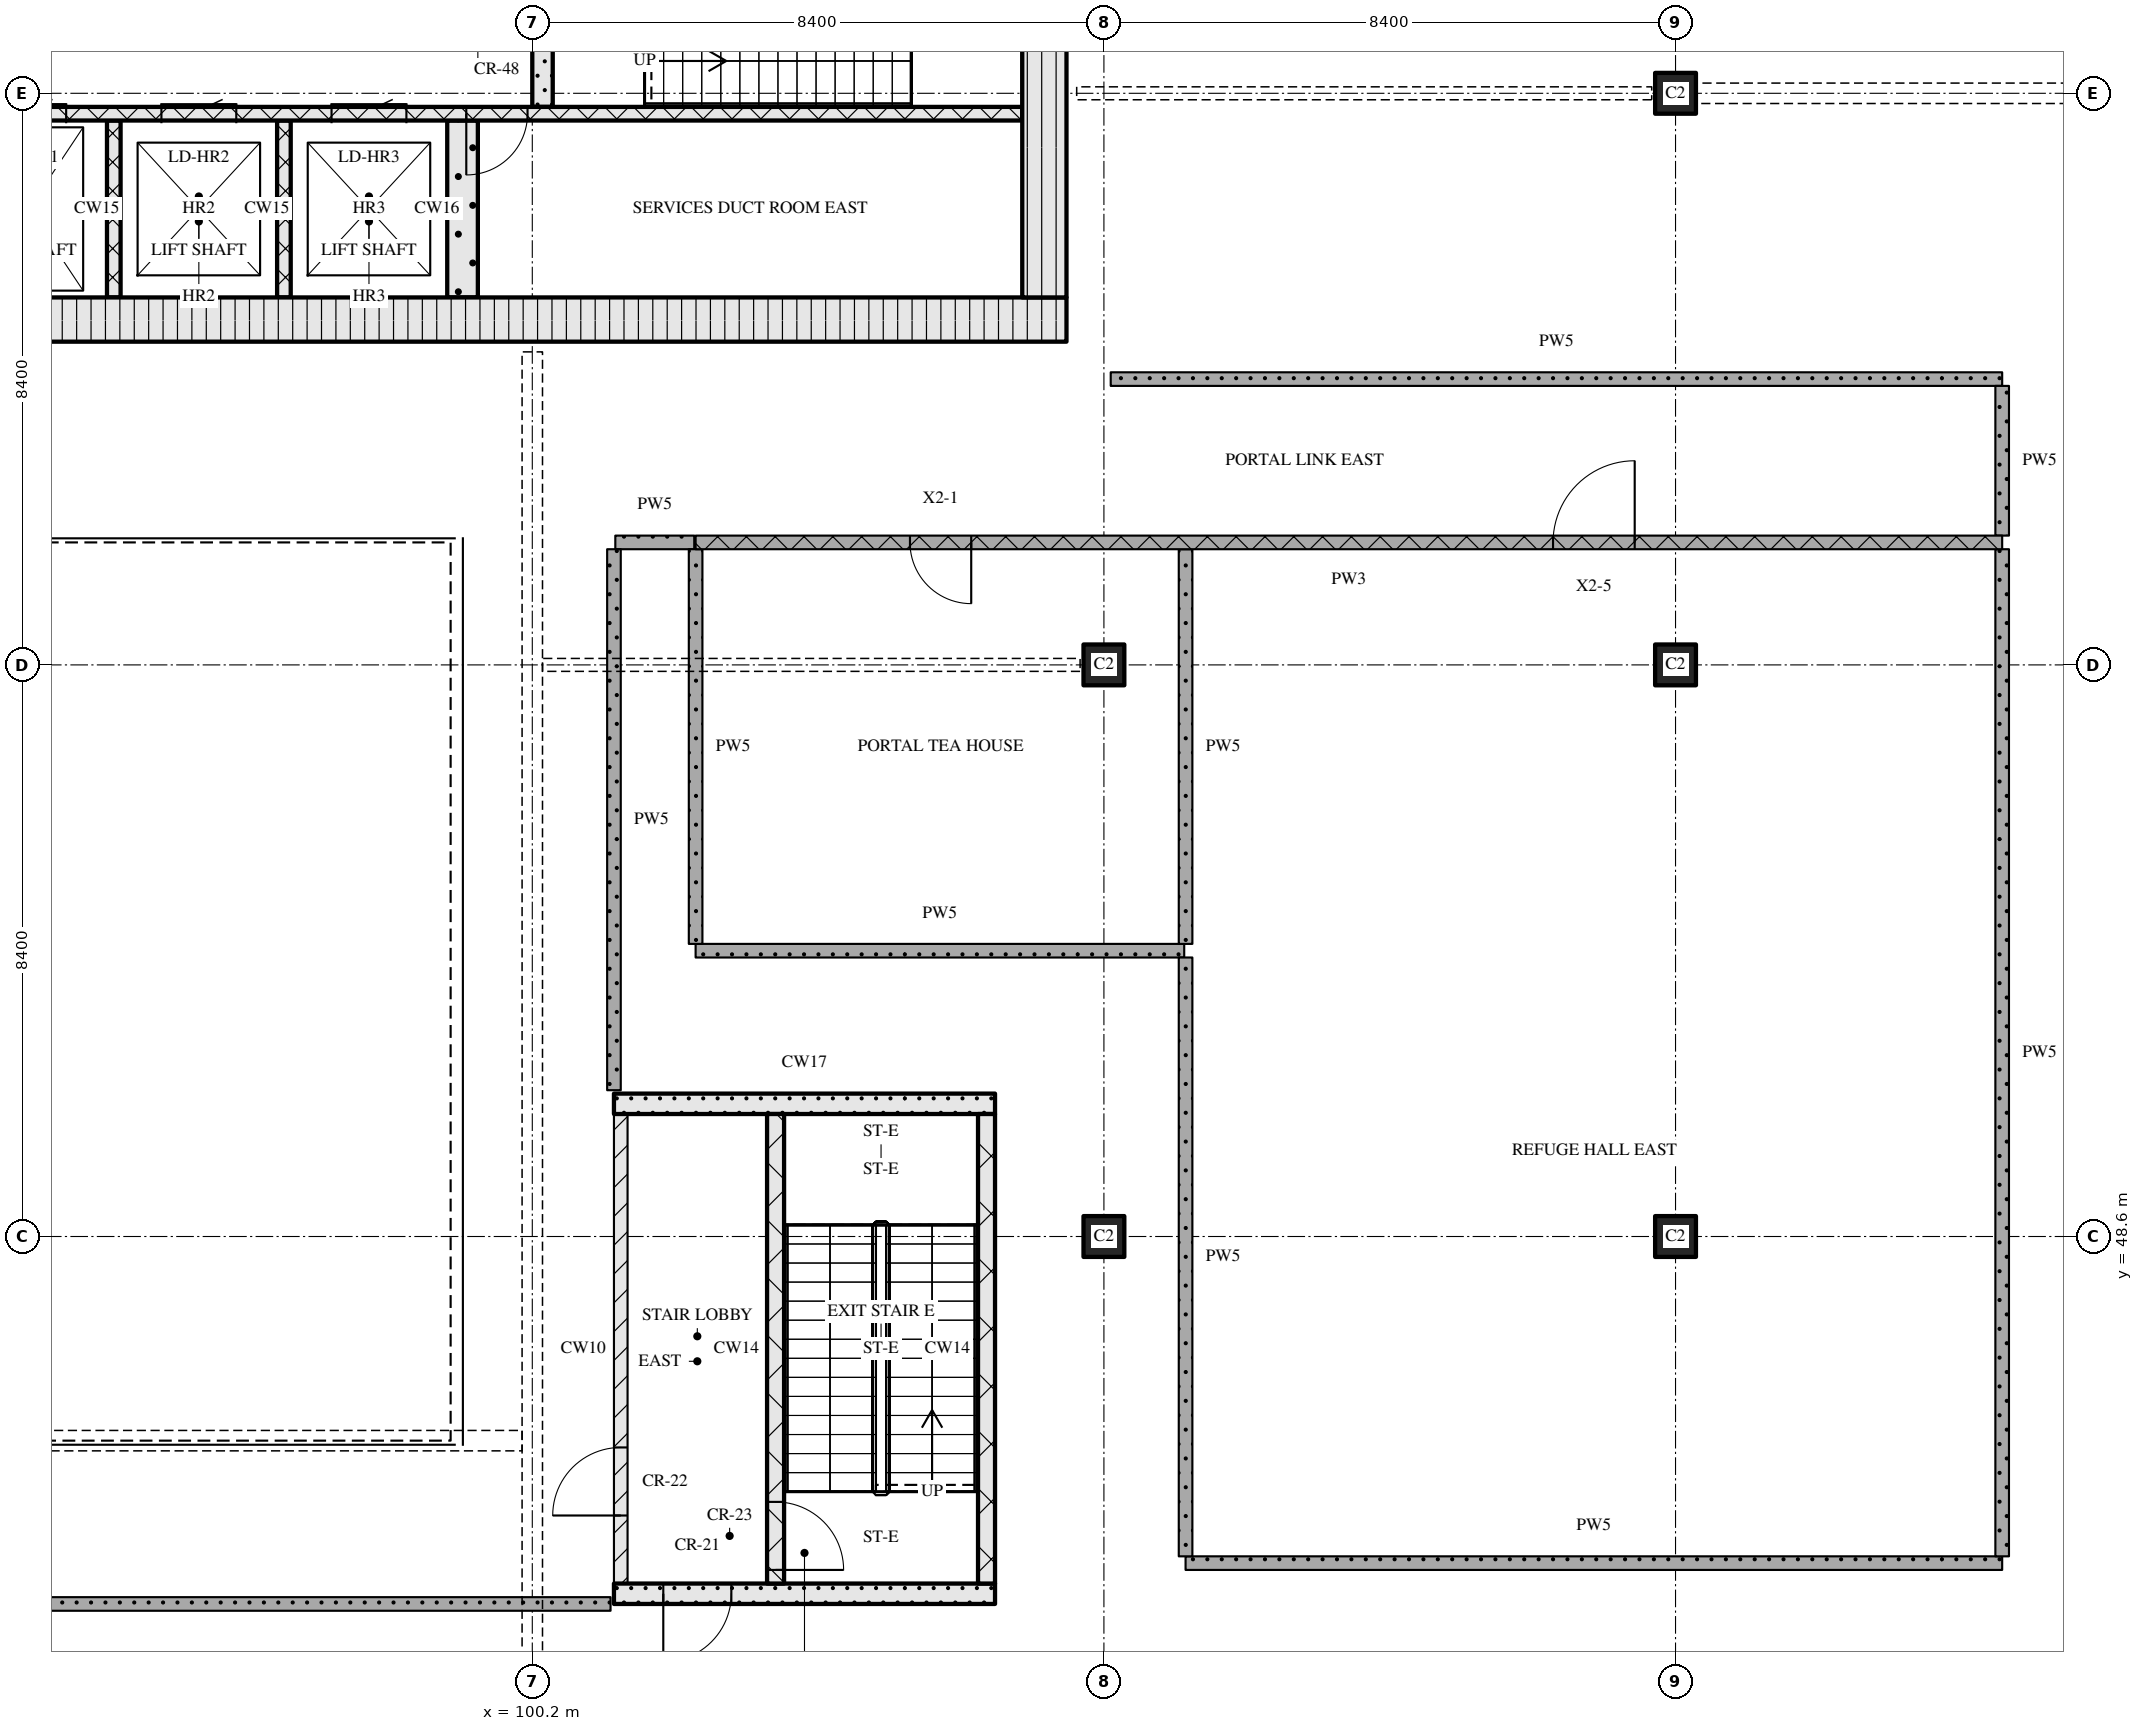
"""IFC4 building model, lengths in metres.
Left out: names, types, materials, properties, quantities, classifications, styles, units other than length and angle.
Written with IfcOpenShell. Run it as: python <this file> out.ifc"""

import sys

from ifc_helpers import new_model, si_unit, direction, frame, frame_2d, origin, origin_2d, place, context, subcontext, project, spatial, rectangle, extrude, element, fill, save


model = new_model("IFC4")
c1 = context("Model", 3, precision=1e-05, world=origin(), true_north=direction((0.0, 1.0)))
c2 = subcontext(c1, "Body", "Model", "MODEL_VIEW")
j1 = project(units=[si_unit("LENGTHUNIT", "METRE"), si_unit("PLANEANGLEUNIT", "RADIAN")], contexts=[c1])
p1 = place(None, origin())
s1 = spatial("IfcSite", under=j1, at=p1, CompositionType="ELEMENT")
p2 = place(p1, origin())
s2 = spatial("IfcBuilding", under=s1, at=p2, CompositionType="ELEMENT")
p3 = place(p2, frame((0.0, 0.0, 194.25)))
s3 = spatial("IfcBuildingStorey", under=s2, at=p3, CompositionType="ELEMENT", Elevation=194.25)
for number, where, z_axis, x_axis in (
    (1, (108.6, 48.6, 0.0), (0.0, 0.0, 1.0), (1.0, 0.0, 0.0)),
    (2, (108.6, 57.0, 0.0), (0.0, 0.0, 1.0), (1.0, 0.0, 0.0)),
    (3, (117.0, 48.6, 0.0), (0.0, 0.0, 1.0), (1.0, 0.0, 0.0)),
    (4, (117.0, 57.0, 0.0), (0.0, 0.0, 1.0), (1.0, 0.0, 0.0)),
    (5, (117.0, 65.4, 0.0), (0.0, 0.0, 1.0), (1.0, 0.0, 0.0)),
):
    element("IfcColumn", number, at=place(p3, frame(where, z_axis=z_axis, x_axis=x_axis)), inside=s3, PredefinedType="COLUMN", context=c2, shape_type="SweptSolid", body=[
        extrude(rectangle(XDim=0.6, YDim=0.6, at=origin_2d()), origin(), (0.0, 0.0, 1.0), 11.25),
    ])
p4 = place(p3, frame((67.15, 62.075, 0.0), z_axis=(0.0, 0.0, 1.0), x_axis=(1.0, 0.0, 0.0)))
e6 = element("IfcWall", 6, at=p4, inside=s3, PredefinedType="SOLIDWALL", context=c2, shape_type="SweptSolid", body=[
    extrude(rectangle(XDim=40.9, YDim=0.65, at=frame_2d((20.45, 0.0))), origin(), (0.0, 0.0, 1.0), 10.97),
])
p5 = place(p4, frame((20.8, 0.0, 0.0)))
e7 = element("IfcOpeningElement", 7, at=p5, cuts=e6, PredefinedType="OPENING", context=c2, shape_type="SweptSolid", body=[
    extrude(rectangle(XDim=1.8, YDim=2.1, at=frame_2d((0.9, 1.05))), frame((0.0, 0.335, 0.0), z_axis=(0.0, -1.0, 0.0), x_axis=(1.0, 0.0, 0.0)), (0.0, 0.0, 1.0), 0.67),
])
p6 = place(p3, frame((107.725, 62.4, 0.0), z_axis=(0.0, 0.0, 1.0), x_axis=(0.0, 1.0, 0.0)))
e8 = element("IfcWall", 8, at=p6, inside=s3, PredefinedType="SOLIDWALL", context=c2, shape_type="SweptSolid", body=[
    extrude(rectangle(XDim=12.0, YDim=0.65, at=frame_2d((6.0, 0.0))), origin(), (0.0, 0.0, 1.0), 10.97),
])
p7 = place(p6, frame((6.45, 0.0, 0.0)))
e9 = element("IfcOpeningElement", 9, at=p7, cuts=e8, PredefinedType="OPENING", context=c2, shape_type="SweptSolid", body=[
    extrude(rectangle(XDim=1.2, YDim=2.1, at=frame_2d((0.6, 1.05))), frame((0.0, 0.335, 0.0), z_axis=(0.0, -1.0, 0.0), x_axis=(1.0, 0.0, 0.0)), (0.0, 0.0, 1.0), 0.67),
])
for number, where, z_axis, x_axis in (
    (10, (94.05, 62.4, 0.0), (0.0, 0.0, 1.0), (0.0, 1.0, 0.0)),
    (11, (96.55, 62.4, 0.0), (0.0, 0.0, 1.0), (0.0, 1.0, 0.0)),
):
    element("IfcWall", number, at=place(p3, frame(where, z_axis=z_axis, x_axis=x_axis)), inside=s3, PredefinedType="SOLIDWALL", context=c2, shape_type="SweptSolid", body=[
        extrude(rectangle(XDim=2.6, YDim=0.2, at=frame_2d((1.3, 0.0))), origin(), (0.0, 0.0, 1.0), 10.97),
    ])
p8 = place(p3, frame((99.175, 62.4, 0.0), z_axis=(0.0, 0.0, 1.0), x_axis=(0.0, 1.0, 0.0)))
e12 = element("IfcWall", 12, at=p8, inside=s3, PredefinedType="SOLIDWALL", context=c2, shape_type="SweptSolid", body=[
    extrude(rectangle(XDim=2.6, YDim=0.45, at=frame_2d((1.3, 0.0))), origin(), (0.0, 0.0, 1.0), 10.97),
])
p9 = place(p3, frame((91.4, 65.1, 0.0), z_axis=(0.0, 0.0, 1.0), x_axis=(1.0, 0.0, 0.0)))
e13 = element("IfcWall", 13, at=p9, inside=s3, PredefinedType="SOLIDWALL", context=c2, shape_type="SweptSolid", body=[
    extrude(rectangle(XDim=16.0, YDim=0.2, at=frame_2d((8.0, 0.0))), origin(), (0.0, 0.0, 1.0), 10.97),
])
p10 = place(p9, frame((0.85, 0.0, 0.0)))
e14 = element("IfcOpeningElement", 14, at=p10, cuts=e13, PredefinedType="OPENING", context=c2, shape_type="SweptSolid", body=[
    extrude(rectangle(XDim=1.1, YDim=2.1, at=frame_2d((0.55, 1.05))), frame((0.0, 0.11, 0.0), z_axis=(0.0, -1.0, 0.0), x_axis=(1.0, 0.0, 0.0)), (0.0, 0.0, 1.0), 0.22),
])
p11 = place(p9, frame((3.35, 0.0, 0.0)))
e15 = element("IfcOpeningElement", 15, at=p11, cuts=e13, PredefinedType="OPENING", context=c2, shape_type="SweptSolid", body=[
    extrude(rectangle(XDim=1.1, YDim=2.1, at=frame_2d((0.55, 1.05))), frame((0.0, 0.11, 0.0), z_axis=(0.0, -1.0, 0.0), x_axis=(1.0, 0.0, 0.0)), (0.0, 0.0, 1.0), 0.22),
])
p12 = place(p9, frame((5.85, 0.0, 0.0)))
e16 = element("IfcOpeningElement", 16, at=p12, cuts=e13, PredefinedType="OPENING", context=c2, shape_type="SweptSolid", body=[
    extrude(rectangle(XDim=1.1, YDim=2.1, at=frame_2d((0.55, 1.05))), frame((0.0, 0.11, 0.0), z_axis=(0.0, -1.0, 0.0), x_axis=(1.0, 0.0, 0.0)), (0.0, 0.0, 1.0), 0.22),
])
p13 = place(p9, frame((7.83, 0.0, 0.0)))
e17 = element("IfcOpeningElement", 17, at=p13, cuts=e13, PredefinedType="OPENING", context=c2, shape_type="SweptSolid", body=[
    extrude(rectangle(XDim=0.9, YDim=2.1, at=frame_2d((0.45, 1.05))), frame((0.0, 0.11, 0.0), z_axis=(0.0, -1.0, 0.0), x_axis=(1.0, 0.0, 0.0)), (0.0, 0.0, 1.0), 0.22),
])
p14 = place(p3, frame((100.35, 65.2, 0.0), z_axis=(0.0, 0.0, 1.0), x_axis=(0.0, 1.0, 0.0)))
e18 = element("IfcWall", 18, at=p14, inside=s3, PredefinedType="SOLIDWALL", context=c2, shape_type="SweptSolid", body=[
    extrude(rectangle(XDim=2.85, YDim=0.3, at=frame_2d((1.425, 0.0))), origin(), (0.0, 0.0, 1.0), 10.97),
])
p15 = place(p3, frame((101.4, 43.35, 0.0), z_axis=(0.0, 0.0, 1.0), x_axis=(1.0, 0.0, 0.0)))
e19 = element("IfcWall", 19, at=p15, inside=s3, PredefinedType="SOLIDWALL", context=c2, shape_type="SweptSolid", body=[
    extrude(rectangle(XDim=5.6, YDim=0.3, at=frame_2d((2.8, 0.0))), origin(), (0.0, 0.0, 1.0), 10.97),
])
p16 = place(p15, frame((0.725, 0.0, 0.0)))
e20 = element("IfcOpeningElement", 20, at=p16, cuts=e19, PredefinedType="OPENING", context=c2, shape_type="SweptSolid", body=[
    extrude(rectangle(XDim=1.0, YDim=2.1, at=frame_2d((0.5, 1.05))), frame((0.0, 0.16, 0.0), z_axis=(0.0, -1.0, 0.0), x_axis=(1.0, 0.0, 0.0)), (0.0, 0.0, 1.0), 0.32),
])
p17 = place(p3, frame((101.5, 43.5, 0.0), z_axis=(0.0, 0.0, 1.0), x_axis=(0.0, 1.0, 0.0)))
e21 = element("IfcWall", 21, at=p17, inside=s3, PredefinedType="PARTITIONING", context=c2, shape_type="SweptSolid", body=[
    extrude(rectangle(XDim=6.9, YDim=0.2, at=frame_2d((3.45, 0.0))), origin(), (0.0, 0.0, 1.0), 10.97),
])
p18 = place(p17, frame((1.0, 0.0, 0.0)))
e22 = element("IfcOpeningElement", 22, at=p18, cuts=e21, PredefinedType="OPENING", context=c2, shape_type="SweptSolid", body=[
    extrude(rectangle(XDim=1.0, YDim=2.1, at=frame_2d((0.5, 1.05))), frame((0.0, 0.11, 0.0), z_axis=(0.0, -1.0, 0.0), x_axis=(1.0, 0.0, 0.0)), (0.0, 0.0, 1.0), 0.22),
])
p19 = place(p3, frame((103.775, 43.5, 0.0), z_axis=(0.0, 0.0, 1.0), x_axis=(0.0, 1.0, 0.0)))
e23 = element("IfcWall", 23, at=p19, inside=s3, PredefinedType="SOLIDWALL", context=c2, shape_type="SweptSolid", body=[
    extrude(rectangle(XDim=6.9, YDim=0.25, at=frame_2d((3.45, 0.0))), origin(), (0.0, 0.0, 1.0), 10.97),
])
p20 = place(p19, frame((0.2, 0.0, 0.0)))
e24 = element("IfcOpeningElement", 24, at=p20, cuts=e23, PredefinedType="OPENING", context=c2, shape_type="SweptSolid", body=[
    extrude(rectangle(XDim=1.0, YDim=2.1, at=frame_2d((0.5, 1.05))), frame((0.0, 0.135, 0.0), z_axis=(0.0, -1.0, 0.0), x_axis=(1.0, 0.0, 0.0)), (0.0, 0.0, 1.0), 0.27),
])
p21 = place(p3, frame((106.875, 43.5, 0.0), z_axis=(0.0, 0.0, 1.0), x_axis=(0.0, 1.0, 0.0)))
e25 = element("IfcWall", 25, at=p21, inside=s3, PredefinedType="SOLIDWALL", context=c2, shape_type="SweptSolid", body=[
    extrude(rectangle(XDim=6.9, YDim=0.25, at=frame_2d((3.45, 0.0))), origin(), (0.0, 0.0, 1.0), 10.97),
])
p22 = place(p3, frame((101.4, 50.55, 0.0), z_axis=(0.0, 0.0, 1.0), x_axis=(1.0, 0.0, 0.0)))
e26 = element("IfcWall", 26, at=p22, inside=s3, PredefinedType="SOLIDWALL", context=c2, shape_type="SweptSolid", body=[
    extrude(rectangle(XDim=5.6, YDim=0.3, at=frame_2d((2.8, 0.0))), origin(), (0.0, 0.0, 1.0), 10.97),
])
p23 = place(p3, frame((73.85, 43.2, 0.0), z_axis=(0.0, 0.0, 1.0), x_axis=(1.0, 0.0, 0.0)))
e27 = element("IfcWall", 27, at=p23, inside=s3, PredefinedType="PARTITIONING", context=c2, shape_type="SweptSolid", body=[
    extrude(rectangle(XDim=27.5, YDim=0.2, at=frame_2d((13.75, 0.0))), origin(), (0.0, 0.0, 1.0), 10.97),
])
p24 = place(p3, frame((109.8, 43.8, 0.0), z_axis=(0.0, 0.0, 1.0), x_axis=(1.0, 0.0, 0.0)))
e28 = element("IfcWall", 28, at=p24, inside=s3, PredefinedType="PARTITIONING", context=c2, shape_type="SweptSolid", body=[
    extrude(rectangle(XDim=12.0, YDim=0.2, at=frame_2d((6.0, 0.0))), origin(), (0.0, 0.0, 1.0), 10.97),
])
p25 = place(p3, frame((102.6, 52.8, 0.0), z_axis=(0.0, 0.0, 1.0), x_axis=(1.0, 0.0, 0.0)))
e29 = element("IfcWall", 29, at=p25, inside=s3, PredefinedType="PARTITIONING", context=c2, shape_type="SweptSolid", body=[
    extrude(rectangle(XDim=7.18, YDim=0.2, at=frame_2d((3.59, 0.0))), origin(), (0.0, 0.0, 1.0), 10.97),
])
p26 = place(p3, frame((121.8, 58.8, 0.0), z_axis=(0.0, 0.0, 1.0), x_axis=(-1.0, 0.0, 0.0)))
e30 = element("IfcWall", 30, at=p26, inside=s3, PredefinedType="PARTITIONING", context=c2, shape_type="SweptSolid", body=[
    extrude(rectangle(XDim=19.2, YDim=0.2, at=frame_2d((9.6, 0.0))), origin(), (0.0, 0.0, 1.0), 10.97),
])
p27 = place(p26, frame((5.4, 0.0, 0.0)))
e31 = element("IfcOpeningElement", 31, at=p27, cuts=e30, PredefinedType="OPENING", context=c2, shape_type="SweptSolid", body=[
    extrude(rectangle(XDim=1.2, YDim=2.1, at=frame_2d((0.6, 1.05))), frame((0.0, 0.11, 0.0), z_axis=(0.0, -1.0, 0.0), x_axis=(1.0, 0.0, 0.0)), (0.0, 0.0, 1.0), 0.22),
])
p28 = place(p26, frame((15.15, 0.0, 0.0)))
e32 = element("IfcOpeningElement", 32, at=p28, cuts=e30, PredefinedType="OPENING", context=c2, shape_type="SweptSolid", body=[
    extrude(rectangle(XDim=0.9, YDim=2.1, at=frame_2d((0.45, 1.05))), frame((0.0, 0.11, 0.0), z_axis=(0.0, -1.0, 0.0), x_axis=(1.0, 0.0, 0.0)), (0.0, 0.0, 1.0), 0.22),
])
p29 = place(p3, frame((101.42, 58.8, 0.0), z_axis=(0.0, 0.0, 1.0), x_axis=(1.0, 0.0, 0.0)))
e33 = element("IfcWall", 33, at=p29, inside=s3, PredefinedType="PARTITIONING", context=c2, shape_type="SweptSolid", body=[
    extrude(rectangle(XDim=1.16, YDim=0.2, at=frame_2d((0.58, 0.0))), origin(), (0.0, 0.0, 1.0), 10.97),
])
p30 = place(p3, frame((108.7, 61.2, 0.0), z_axis=(0.0, 0.0, 1.0), x_axis=(1.0, 0.0, 0.0)))
e34 = element("IfcWall", 34, at=p30, inside=s3, PredefinedType="PARTITIONING", context=c2, shape_type="SweptSolid", body=[
    extrude(rectangle(XDim=13.1, YDim=0.2, at=frame_2d((6.55, 0.0))), origin(), (0.0, 0.0, 1.0), 10.97),
])
p31 = place(p3, frame((101.4, 58.7, 0.0), z_axis=(0.0, 0.0, 1.0), x_axis=(0.0, -1.0, 0.0)))
e35 = element("IfcWall", 35, at=p31, inside=s3, PredefinedType="PARTITIONING", context=c2, shape_type="SweptSolid", body=[
    extrude(rectangle(XDim=7.95, YDim=0.2, at=frame_2d((3.975, 0.0))), origin(), (0.0, 0.0, 1.0), 10.97),
])
p32 = place(p3, frame((102.6, 58.7, 0.0), z_axis=(0.0, 0.0, 1.0), x_axis=(0.0, -1.0, 0.0)))
e36 = element("IfcWall", 36, at=p32, inside=s3, PredefinedType="PARTITIONING", context=c2, shape_type="SweptSolid", body=[
    extrude(rectangle(XDim=5.8, YDim=0.2, at=frame_2d((2.9, 0.0))), origin(), (0.0, 0.0, 1.0), 10.97),
])
p33 = place(p3, frame((109.8, 52.7, 0.0), z_axis=(0.0, 0.0, 1.0), x_axis=(0.0, -1.0, 0.0)))
e37 = element("IfcWall", 37, at=p33, inside=s3, PredefinedType="PARTITIONING", context=c2, shape_type="SweptSolid", body=[
    extrude(rectangle(XDim=8.8, YDim=0.2, at=frame_2d((4.4, 0.0))), origin(), (0.0, 0.0, 1.0), 10.97),
])
p34 = place(p3, frame((109.8, 58.7, 0.0), z_axis=(0.0, 0.0, 1.0), x_axis=(0.0, -1.0, 0.0)))
e38 = element("IfcWall", 38, at=p34, inside=s3, PredefinedType="PARTITIONING", context=c2, shape_type="SweptSolid", body=[
    extrude(rectangle(XDim=5.8, YDim=0.2, at=frame_2d((2.9, 0.0))), origin(), (0.0, 0.0, 1.0), 10.97),
])
p35 = place(p3, frame((121.8, 58.7, 0.0), z_axis=(0.0, 0.0, 1.0), x_axis=(0.0, -1.0, 0.0)))
e39 = element("IfcWall", 39, at=p35, inside=s3, PredefinedType="PARTITIONING", context=c2, shape_type="SweptSolid", body=[
    extrude(rectangle(XDim=14.8, YDim=0.2, at=frame_2d((7.4, 0.0))), origin(), (0.0, 0.0, 1.0), 10.97),
])
p36 = place(p3, frame((121.8, 61.1, 0.0), z_axis=(0.0, 0.0, 1.0), x_axis=(0.0, -1.0, 0.0)))
e40 = element("IfcWall", 40, at=p36, inside=s3, PredefinedType="PARTITIONING", context=c2, shape_type="SweptSolid", body=[
    extrude(rectangle(XDim=2.2, YDim=0.2, at=frame_2d((1.1, 0.0))), origin(), (0.0, 0.0, 1.0), 10.97),
])
p37 = place(p10, origin())
e41 = element("IfcDoor", 41, at=p37, inside=s3, OperationType="SLIDING_TO_LEFT", PredefinedType="DOOR", context=c2, shape_type="SweptSolid", body=[
    extrude(rectangle(XDim=1.1, YDim=2.1, at=frame_2d((0.55, 1.05))), frame((0.0, 0.025, 0.0), z_axis=(0.0, -1.0, 0.0), x_axis=(1.0, 0.0, 0.0)), (0.0, 0.0, 1.0), 0.05),
])
fill(e14, e41)
p38 = place(p11, origin())
e42 = element("IfcDoor", 42, at=p38, inside=s3, OperationType="SLIDING_TO_LEFT", PredefinedType="DOOR", context=c2, shape_type="SweptSolid", body=[
    extrude(rectangle(XDim=1.1, YDim=2.1, at=frame_2d((0.55, 1.05))), frame((0.0, 0.025, 0.0), z_axis=(0.0, -1.0, 0.0), x_axis=(1.0, 0.0, 0.0)), (0.0, 0.0, 1.0), 0.05),
])
fill(e15, e42)
p39 = place(p12, origin())
e43 = element("IfcDoor", 43, at=p39, inside=s3, OperationType="SLIDING_TO_LEFT", PredefinedType="DOOR", context=c2, shape_type="SweptSolid", body=[
    extrude(rectangle(XDim=1.1, YDim=2.1, at=frame_2d((0.55, 1.05))), frame((0.0, 0.025, 0.0), z_axis=(0.0, -1.0, 0.0), x_axis=(1.0, 0.0, 0.0)), (0.0, 0.0, 1.0), 0.05),
])
fill(e16, e43)
p40 = place(p13, origin())
e44 = element("IfcDoor", 44, at=p40, inside=s3, OperationType="SINGLE_SWING_RIGHT", PredefinedType="DOOR", context=c2, shape_type="SweptSolid", body=[
    extrude(rectangle(XDim=0.9, YDim=2.1, at=frame_2d((0.45, 1.05))), frame((0.0, 0.025, 0.0), z_axis=(0.0, -1.0, 0.0), x_axis=(1.0, 0.0, 0.0)), (0.0, 0.0, 1.0), 0.05),
])
fill(e17, e44)
p41 = place(p16, origin())
e45 = element("IfcDoor", 45, at=p41, inside=s3, OperationType="SINGLE_SWING_RIGHT", PredefinedType="DOOR", context=c2, shape_type="SweptSolid", body=[
    extrude(rectangle(XDim=1.0, YDim=2.1, at=frame_2d((0.5, 1.05))), frame((0.0, 0.025, 0.0), z_axis=(0.0, -1.0, 0.0), x_axis=(1.0, 0.0, 0.0)), (0.0, 0.0, 1.0), 0.05),
])
fill(e20, e45)
p42 = place(p20, origin())
e46 = element("IfcDoor", 46, at=p42, inside=s3, OperationType="SINGLE_SWING_RIGHT", PredefinedType="DOOR", context=c2, shape_type="SweptSolid", body=[
    extrude(rectangle(XDim=1.0, YDim=2.1, at=frame_2d((0.5, 1.05))), frame((0.0, 0.025, 0.0), z_axis=(0.0, -1.0, 0.0), x_axis=(1.0, 0.0, 0.0)), (0.0, 0.0, 1.0), 0.05),
])
fill(e24, e46)
p43 = place(p18, origin())
e47 = element("IfcDoor", 47, at=p43, inside=s3, OperationType="SINGLE_SWING_LEFT", PredefinedType="DOOR", context=c2, shape_type="SweptSolid", body=[
    extrude(rectangle(XDim=1.0, YDim=2.1, at=frame_2d((0.5, 1.05))), frame((0.0, 0.025, 0.0), z_axis=(0.0, -1.0, 0.0), x_axis=(1.0, 0.0, 0.0)), (0.0, 0.0, 1.0), 0.05),
])
fill(e22, e47)
p44 = place(p27, origin())
e48 = element("IfcDoor", 48, at=p44, inside=s3, OperationType="SINGLE_SWING_RIGHT", PredefinedType="DOOR", context=c2, shape_type="SweptSolid", body=[
    extrude(rectangle(XDim=1.2, YDim=2.1, at=frame_2d((0.6, 1.05))), frame((0.0, 0.025, 0.0), z_axis=(0.0, -1.0, 0.0), x_axis=(1.0, 0.0, 0.0)), (0.0, 0.0, 1.0), 0.05),
])
fill(e31, e48)
p45 = place(p28, origin())
e49 = element("IfcDoor", 49, at=p45, inside=s3, OperationType="SINGLE_SWING_LEFT", PredefinedType="DOOR", context=c2, shape_type="SweptSolid", body=[
    extrude(rectangle(XDim=0.9, YDim=2.1, at=frame_2d((0.45, 1.05))), frame((0.0, 0.025, 0.0), z_axis=(0.0, -1.0, 0.0), x_axis=(1.0, 0.0, 0.0)), (0.0, 0.0, 1.0), 0.05),
])
fill(e32, e49)
save(model, sys.argv[1])
